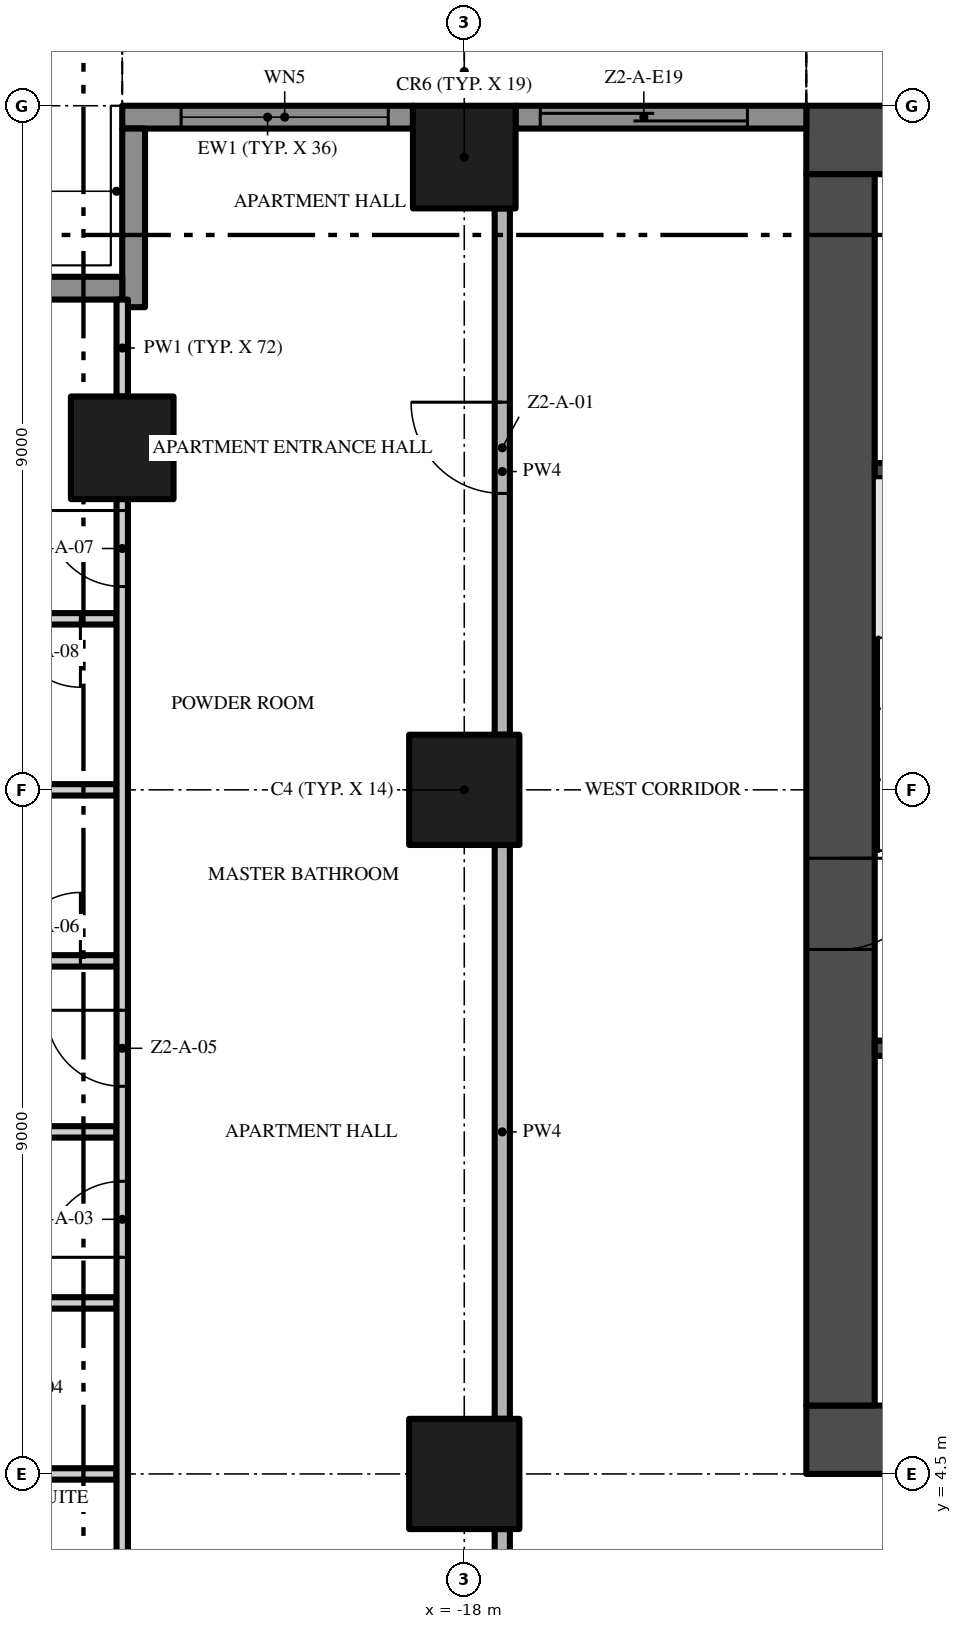
"""IFC4 building model, lengths in metres.
Left out: names, types, materials, properties, quantities, classifications, styles, units other than length and angle.
Written with IfcOpenShell. Run it as: python <this file> out.ifc"""

import sys

from ifc_helpers import new_model, si_unit, direction, frame, frame_2d, origin, origin_2d, place, context, subcontext, project, spatial, rectangle, extrude, element, fill, save


model = new_model("IFC4")
c1 = context("Model", 3, precision=1e-05, world=origin(), true_north=direction((0.0, 1.0)))
c2 = subcontext(c1, "Body", "Model", "MODEL_VIEW")
j1 = project(units=[si_unit("LENGTHUNIT", "METRE"), si_unit("PLANEANGLEUNIT", "RADIAN")], contexts=[c1])
p1 = place(None, origin())
s1 = spatial("IfcSite", under=j1, at=p1, CompositionType="ELEMENT")
p2 = place(p1, origin())
s2 = spatial("IfcBuilding", under=s1, at=p2, CompositionType="ELEMENT")
p3 = place(p2, frame((0.0, 0.0, 77.0)))
s3 = spatial("IfcBuildingStorey", under=s2, at=p3, CompositionType="ELEMENT", Elevation=77.0)
p4 = place(p3, frame((-13.5, 4.95, -0.3), z_axis=(0.0, 0.0, 1.0), x_axis=(1.0, 0.0, 0.0)))
e1 = element("IfcWall", 1, at=p4, inside=s3, PredefinedType="SHEAR", context=c2, shape_type="SweptSolid", body=[
    extrude(rectangle(XDim=27.0, YDim=0.9, at=frame_2d((13.5, 0.0))), origin(), (0.0, 0.0, 1.0), 3.8),
])
p5 = place(p4, frame((12.0, 0.0, 0.3)))
e2 = element("IfcOpeningElement", 2, at=p5, cuts=e1, PredefinedType="OPENING", context=c2, shape_type="SweptSolid", body=[
    extrude(rectangle(XDim=3.0, YDim=2.4, at=frame_2d((1.5, 1.2))), frame((0.0, 0.46, 0.0), z_axis=(0.0, -1.0, 0.0), x_axis=(1.0, 0.0, 0.0)), (0.0, 0.0, 1.0), 0.92),
])
p6 = place(p4, frame((4.9, 0.0, 0.3)))
e3 = element("IfcOpeningElement", 3, at=p6, cuts=e1, PredefinedType="OPENING", context=c2, shape_type="SweptSolid", body=[
    extrude(rectangle(XDim=1.2, YDim=2.2, at=frame_2d((0.6, 1.1))), frame((0.0, 0.46, 0.0), z_axis=(0.0, -1.0, 0.0), x_axis=(1.0, 0.0, 0.0)), (0.0, 0.0, 1.0), 0.92),
])
p7 = place(p4, frame((20.75, 0.0, 0.3)))
e4 = element("IfcOpeningElement", 4, at=p7, cuts=e1, PredefinedType="OPENING", context=c2, shape_type="SweptSolid", body=[
    extrude(rectangle(XDim=1.5, YDim=2.2, at=frame_2d((0.75, 1.1))), frame((0.0, 0.46, 0.0), z_axis=(0.0, -1.0, 0.0), x_axis=(1.0, 0.0, 0.0)), (0.0, 0.0, 1.0), 0.92),
])
p8 = place(p4, frame((17.4, 0.0, 0.3)))
e5 = element("IfcOpeningElement", 5, at=p8, cuts=e1, PredefinedType="OPENING", context=c2, shape_type="SweptSolid", body=[
    extrude(rectangle(XDim=1.2, YDim=2.2, at=frame_2d((0.6, 1.1))), frame((0.0, 0.46, 0.0), z_axis=(0.0, -1.0, 0.0), x_axis=(1.0, 0.0, 0.0)), (0.0, 0.0, 1.0), 0.92),
])
p9 = place(p3, frame((13.5, 22.05, -0.3), z_axis=(0.0, 0.0, 1.0), x_axis=(-1.0, 0.0, 0.0)))
e6 = element("IfcWall", 6, at=p9, inside=s3, PredefinedType="SHEAR", context=c2, shape_type="SweptSolid", body=[
    extrude(rectangle(XDim=27.0, YDim=0.9, at=frame_2d((13.5, 0.0))), origin(), (0.0, 0.0, 1.0), 3.8),
])
p10 = place(p3, frame((-13.05, 21.6, -0.3), z_axis=(0.0, 0.0, 1.0), x_axis=(0.0, -1.0, 0.0)))
e7 = element("IfcWall", 7, at=p10, inside=s3, PredefinedType="SHEAR", context=c2, shape_type="SweptSolid", body=[
    extrude(rectangle(XDim=16.2, YDim=0.9, at=frame_2d((8.1, 0.0))), origin(), (0.0, 0.0, 1.0), 3.8),
])
p11 = place(p10, frame((9.0, 0.0, 0.3)))
e8 = element("IfcOpeningElement", 8, at=p11, cuts=e7, PredefinedType="OPENING", context=c2, shape_type="SweptSolid", body=[
    extrude(rectangle(XDim=1.2, YDim=2.2, at=frame_2d((0.6, 1.1))), frame((0.0, 0.46, 0.0), z_axis=(0.0, -1.0, 0.0), x_axis=(1.0, 0.0, 0.0)), (0.0, 0.0, 1.0), 0.92),
])
p12 = place(p3, frame((-18.0, 13.5, 0.0), z_axis=(0.0, 0.0, 1.0), x_axis=(1.0, 0.0, 0.0)))
e9 = element("IfcColumn", 9, at=p12, inside=s3, PredefinedType="COLUMN", context=c2, shape_type="SweptSolid", body=[
    extrude(rectangle(XDim=1.45, YDim=1.45, at=origin_2d()), origin(), (0.0, 0.0, 1.0), 3.5),
])
p13 = place(p3, frame((-18.0, 21.825, 0.0), z_axis=(0.0, 0.0, 1.0), x_axis=(1.0, 0.0, 0.0)))
e10 = element("IfcColumn", 10, at=p13, inside=s3, PredefinedType="COLUMN", context=c2, shape_type="SweptSolid", body=[
    extrude(rectangle(XDim=1.35, YDim=1.35, at=origin_2d()), origin(), (0.0, 0.0, 1.0), 3.5),
])
p14 = place(p3, frame((-18.0, 4.5, 0.0), z_axis=(0.0, 0.0, 1.0), x_axis=(1.0, 0.0, 0.0)))
e11 = element("IfcColumn", 11, at=p14, inside=s3, PredefinedType="COLUMN", context=c2, shape_type="SweptSolid", body=[
    extrude(rectangle(XDim=1.45, YDim=1.45, at=origin_2d()), origin(), (0.0, 0.0, 1.0), 3.5),
])
p15 = place(p3, frame((-22.5, 18.0, 0.0), z_axis=(0.0, 0.0, 1.0), x_axis=(1.0, 0.0, 0.0)))
e12 = element("IfcColumn", 12, at=p15, inside=s3, PredefinedType="COLUMN", context=c2, shape_type="SweptSolid", body=[
    extrude(rectangle(XDim=1.35, YDim=1.35, at=origin_2d()), origin(), (0.0, 0.0, 1.0), 3.5),
])
p16 = place(p3, frame((-17.325, 22.35, 0.0), z_axis=(0.0, 0.0, 1.0), x_axis=(1.0, 0.0, 0.0)))
e13 = element("IfcWall", 13, at=p16, inside=s3, PredefinedType="SOLIDWALL", context=c2, shape_type="SweptSolid", body=[
    extrude(rectangle(XDim=3.825, YDim=0.3, at=frame_2d((1.913, 0.0))), origin(), (0.0, 0.0, 1.0), 3.5),
])
p17 = place(p16, frame((0.325, 0.0, 0.0)))
e14 = element("IfcOpeningElement", 14, at=p17, cuts=e13, PredefinedType="OPENING", context=c2, shape_type="SweptSolid", body=[
    extrude(rectangle(XDim=2.725, YDim=2.4, at=frame_2d((1.363, 1.2))), frame((0.0, 0.16, 0.0), z_axis=(0.0, -1.0, 0.0), x_axis=(1.0, 0.0, 0.0)), (0.0, 0.0, 1.0), 0.32),
])
p18 = place(p3, frame((-22.5, 22.35, 0.0), z_axis=(0.0, 0.0, 1.0), x_axis=(1.0, 0.0, 0.0)))
e15 = element("IfcWall", 15, at=p18, inside=s3, PredefinedType="SOLIDWALL", context=c2, shape_type="SweptSolid", body=[
    extrude(rectangle(XDim=3.825, YDim=0.3, at=frame_2d((1.913, 0.0))), origin(), (0.0, 0.0, 1.0), 3.5),
])
p19 = place(p18, frame((0.775, 0.0, 0.45)))
e16 = element("IfcOpeningElement", 16, at=p19, cuts=e15, PredefinedType="OPENING", context=c2, shape_type="SweptSolid", body=[
    extrude(rectangle(XDim=2.725, YDim=2.65, at=frame_2d((1.363, 1.325))), frame((0.0, 0.16, 0.0), z_axis=(0.0, -1.0, 0.0), x_axis=(1.0, 0.0, 0.0)), (0.0, 0.0, 1.0), 0.32),
])
p20 = place(p3, frame((-22.35, 19.85, 0.0), z_axis=(0.0, 0.0, 1.0), x_axis=(0.0, 1.0, 0.0)))
e17 = element("IfcWall", 17, at=p20, inside=s3, PredefinedType="SOLIDWALL", context=c2, shape_type="SweptSolid", body=[
    extrude(rectangle(XDim=2.35, YDim=0.3, at=frame_2d((1.175, 0.0))), origin(), (0.0, 0.0, 1.0), 3.5),
])
p21 = place(p3, frame((-24.75, 20.1, 0.0), z_axis=(0.0, 0.0, 1.0), x_axis=(1.0, 0.0, 0.0)))
e18 = element("IfcWall", 18, at=p21, inside=s3, PredefinedType="SOLIDWALL", context=c2, shape_type="SweptSolid", body=[
    extrude(rectangle(XDim=2.25, YDim=0.3, at=frame_2d((1.125, 0.0))), origin(), (0.0, 0.0, 1.0), 3.5),
])
for number, where, z_axis, x_axis in (
    (19, (-12.6, 10.1, 0.0), (0.0, 0.0, 1.0), (1.0, 0.0, 0.0)),
    (20, (-12.6, 17.7, 0.0), (0.0, 0.0, 1.0), (1.0, 0.0, 0.0)),
):
    element("IfcWall", number, at=place(p3, frame(where, z_axis=z_axis, x_axis=x_axis)), inside=s3, PredefinedType="SHEAR", context=c2, shape_type="SweptSolid", body=[
        extrude(rectangle(XDim=2.95, YDim=0.2, at=frame_2d((1.475, 0.0))), origin(), (0.0, 0.0, 1.0), 3.5),
    ])
p22 = place(p3, frame((-25.65, 4.5, 0.0), z_axis=(0.0, 0.0, 1.0), x_axis=(1.0, 0.0, 0.0)))
e21 = element("IfcWall", 21, at=p22, inside=s3, PredefinedType="PARTITIONING", context=c2, shape_type="SweptSolid", body=[
    extrude(rectangle(XDim=3.075, YDim=0.15, at=frame_2d((1.538, 0.0))), origin(), (0.0, 0.0, 1.0), 3.5),
])
p23 = place(p3, frame((-24.45, 6.75, 0.0), z_axis=(0.0, 0.0, 1.0), x_axis=(1.0, 0.0, 0.0)))
e22 = element("IfcWall", 22, at=p23, inside=s3, PredefinedType="PARTITIONING", context=c2, shape_type="SweptSolid", body=[
    extrude(rectangle(XDim=1.875, YDim=0.15, at=frame_2d((0.938, 0.0))), origin(), (0.0, 0.0, 1.0), 3.5),
])
p24 = place(p3, frame((-26.7, 9.0, 0.0), z_axis=(0.0, 0.0, 1.0), x_axis=(1.0, 0.0, 0.0)))
e23 = element("IfcWall", 23, at=p24, inside=s3, PredefinedType="PARTITIONING", context=c2, shape_type="SweptSolid", body=[
    extrude(rectangle(XDim=4.125, YDim=0.15, at=frame_2d((2.062, 0.0))), origin(), (0.0, 0.0, 1.0), 3.5),
])
p25 = place(p3, frame((-24.45, 11.25, 0.0), z_axis=(0.0, 0.0, 1.0), x_axis=(1.0, 0.0, 0.0)))
e24 = element("IfcWall", 24, at=p25, inside=s3, PredefinedType="PARTITIONING", context=c2, shape_type="SweptSolid", body=[
    extrude(rectangle(XDim=1.875, YDim=0.15, at=frame_2d((0.938, 0.0))), origin(), (0.0, 0.0, 1.0), 3.5),
])
p26 = place(p25, frame((0.5, 0.0, 0.0)))
e25 = element("IfcOpeningElement", 25, at=p26, cuts=e24, PredefinedType="OPENING", context=c2, shape_type="SweptSolid", body=[
    extrude(rectangle(XDim=0.9, YDim=2.1, at=frame_2d((0.45, 1.05))), frame((0.0, 0.085, 0.0), z_axis=(0.0, -1.0, 0.0), x_axis=(1.0, 0.0, 0.0)), (0.0, 0.0, 1.0), 0.17),
])
p27 = place(p3, frame((-24.45, 13.5, 0.0), z_axis=(0.0, 0.0, 1.0), x_axis=(1.0, 0.0, 0.0)))
e26 = element("IfcWall", 26, at=p27, inside=s3, PredefinedType="PARTITIONING", context=c2, shape_type="SweptSolid", body=[
    extrude(rectangle(XDim=1.875, YDim=0.15, at=frame_2d((0.938, 0.0))), origin(), (0.0, 0.0, 1.0), 3.5),
])
p28 = place(p3, frame((-22.575, 15.75, 0.0), z_axis=(0.0, 0.0, 1.0), x_axis=(-1.0, 0.0, 0.0)))
e27 = element("IfcWall", 27, at=p28, inside=s3, PredefinedType="PARTITIONING", context=c2, shape_type="SweptSolid", body=[
    extrude(rectangle(XDim=1.875, YDim=0.15, at=frame_2d((0.938, 0.0))), origin(), (0.0, 0.0, 1.0), 3.5),
])
p29 = place(p28, frame((0.475, 0.0, 0.0)))
e28 = element("IfcOpeningElement", 28, at=p29, cuts=e27, PredefinedType="OPENING", context=c2, shape_type="SweptSolid", body=[
    extrude(rectangle(XDim=0.9, YDim=2.1, at=frame_2d((0.45, 1.05))), frame((0.0, 0.085, 0.0), z_axis=(0.0, -1.0, 0.0), x_axis=(1.0, 0.0, 0.0)), (0.0, 0.0, 1.0), 0.17),
])
p30 = place(p3, frame((-22.5, 0.1, 0.0), z_axis=(0.0, 0.0, 1.0), x_axis=(0.0, 1.0, 0.0)))
e29 = element("IfcWall", 29, at=p30, inside=s3, PredefinedType="PARTITIONING", context=c2, shape_type="SweptSolid", body=[
    extrude(rectangle(XDim=17.225, YDim=0.15, at=frame_2d((8.613, 0.0))), origin(), (0.0, 0.0, 1.0), 3.5),
])
p31 = place(p30, frame((1.65, 0.0, 0.0)))
e30 = element("IfcOpeningElement", 30, at=p31, cuts=e29, PredefinedType="OPENING", context=c2, shape_type="SweptSolid", body=[
    extrude(rectangle(XDim=1.0, YDim=2.4, at=frame_2d((0.5, 1.2))), frame((0.0, 0.085, 0.0), z_axis=(0.0, -1.0, 0.0), x_axis=(1.0, 0.0, 0.0)), (0.0, 0.0, 1.0), 0.17),
])
p32 = place(p30, frame((7.25, 0.0, 0.0)))
e31 = element("IfcOpeningElement", 31, at=p32, cuts=e29, PredefinedType="OPENING", context=c2, shape_type="SweptSolid", body=[
    extrude(rectangle(XDim=1.0, YDim=2.4, at=frame_2d((0.5, 1.2))), frame((0.0, 0.085, 0.0), z_axis=(0.0, -1.0, 0.0), x_axis=(1.0, 0.0, 0.0)), (0.0, 0.0, 1.0), 0.17),
])
p33 = place(p30, frame((9.5, 0.0, 0.0)))
e32 = element("IfcOpeningElement", 32, at=p33, cuts=e29, PredefinedType="OPENING", context=c2, shape_type="SweptSolid", body=[
    extrude(rectangle(XDim=1.0, YDim=2.4, at=frame_2d((0.5, 1.2))), frame((0.0, 0.085, 0.0), z_axis=(0.0, -1.0, 0.0), x_axis=(1.0, 0.0, 0.0)), (0.0, 0.0, 1.0), 0.17),
])
p34 = place(p30, frame((16.075, 0.0, 0.0)))
e33 = element("IfcOpeningElement", 33, at=p34, cuts=e29, PredefinedType="OPENING", context=c2, shape_type="SweptSolid", body=[
    extrude(rectangle(XDim=1.0, YDim=2.4, at=frame_2d((0.5, 1.2))), frame((0.0, 0.085, 0.0), z_axis=(0.0, -1.0, 0.0), x_axis=(1.0, 0.0, 0.0)), (0.0, 0.0, 1.0), 0.17),
])
p35 = place(p3, frame((-22.5, 18.675, 0.0), z_axis=(0.0, 0.0, 1.0), x_axis=(0.0, 1.0, 0.0)))
e34 = element("IfcWall", 34, at=p35, inside=s3, PredefinedType="PARTITIONING", context=c2, shape_type="SweptSolid", body=[
    extrude(rectangle(XDim=1.275, YDim=0.15, at=frame_2d((0.637, 0.0))), origin(), (0.0, 0.0, 1.0), 3.5),
])
p36 = place(p3, frame((-17.5, -0.2, 0.0), z_axis=(0.0, 0.0, 1.0), x_axis=(0.0, 1.0, 0.0)))
e35 = element("IfcWall", 35, at=p36, inside=s3, PredefinedType="PARTITIONING", context=c2, shape_type="SweptSolid", body=[
    extrude(rectangle(XDim=3.975, YDim=0.2, at=frame_2d((1.988, 0.0))), origin(), (0.0, 0.0, 1.0), 3.5),
])
p37 = place(p3, frame((-17.5, 5.225, 0.0), z_axis=(0.0, 0.0, 1.0), x_axis=(0.0, 1.0, 0.0)))
e36 = element("IfcWall", 36, at=p37, inside=s3, PredefinedType="PARTITIONING", context=c2, shape_type="SweptSolid", body=[
    extrude(rectangle(XDim=7.55, YDim=0.2, at=frame_2d((3.775, 0.0))), origin(), (0.0, 0.0, 1.0), 3.5),
])
p38 = place(p3, frame((-17.5, 14.225, 0.0), z_axis=(0.0, 0.0, 1.0), x_axis=(0.0, 1.0, 0.0)))
e37 = element("IfcWall", 37, at=p38, inside=s3, PredefinedType="PARTITIONING", context=c2, shape_type="SweptSolid", body=[
    extrude(rectangle(XDim=6.925, YDim=0.2, at=frame_2d((3.462, 0.0))), origin(), (0.0, 0.0, 1.0), 3.5),
])
p39 = place(p38, frame((3.175, 0.0, 0.0)))
e38 = element("IfcOpeningElement", 38, at=p39, cuts=e37, PredefinedType="OPENING", context=c2, shape_type="SweptSolid", body=[
    extrude(rectangle(XDim=1.2, YDim=2.4, at=frame_2d((0.6, 1.2))), frame((0.0, 0.11, 0.0), z_axis=(0.0, -1.0, 0.0), x_axis=(1.0, 0.0, 0.0)), (0.0, 0.0, 1.0), 0.22),
])
p40 = place(p17, origin())
e39 = element("IfcDoor", 39, at=p40, inside=s3, OperationType="SINGLE_SWING_LEFT", PredefinedType="DOOR", context=c2, shape_type="SweptSolid", body=[
    extrude(rectangle(XDim=2.725, YDim=2.4, at=frame_2d((1.363, 1.2))), frame((0.0, 0.025, 0.0), z_axis=(0.0, -1.0, 0.0), x_axis=(1.0, 0.0, 0.0)), (0.0, 0.0, 1.0), 0.05),
])
fill(e14, e39)
p41 = place(p19, origin())
e40 = element("IfcWindow", 40, at=p41, inside=s3, PartitioningType="SINGLE_PANEL", PredefinedType="WINDOW", context=c2, shape_type="SweptSolid", body=[
    extrude(rectangle(XDim=2.725, YDim=2.65, at=frame_2d((1.363, 1.325))), frame((0.0, 0.03, 0.0), z_axis=(0.0, -1.0, 0.0), x_axis=(1.0, 0.0, 0.0)), (0.0, 0.0, 1.0), 0.06),
])
fill(e16, e40)
p42 = place(p11, frame((1.2, 0.0, 0.0), z_axis=(0.0, 0.0, 1.0), x_axis=(-1.0, 0.0, 0.0)))
e41 = element("IfcDoor", 41, at=p42, inside=s3, OperationType="SINGLE_SWING_RIGHT", PredefinedType="DOOR", context=c2, shape_type="SweptSolid", body=[
    extrude(rectangle(XDim=1.2, YDim=2.2, at=frame_2d((0.6, 1.1))), frame((0.0, 0.025, 0.0), z_axis=(0.0, -1.0, 0.0), x_axis=(1.0, 0.0, 0.0)), (0.0, 0.0, 1.0), 0.05),
])
fill(e8, e41)
p43 = place(p39, origin())
e42 = element("IfcDoor", 42, at=p43, inside=s3, OperationType="SINGLE_SWING_RIGHT", PredefinedType="DOOR", context=c2, shape_type="SweptSolid", body=[
    extrude(rectangle(XDim=1.2, YDim=2.4, at=frame_2d((0.6, 1.2))), frame((0.0, 0.025, 0.0), z_axis=(0.0, -1.0, 0.0), x_axis=(1.0, 0.0, 0.0)), (0.0, 0.0, 1.0), 0.05),
])
fill(e38, e42)
p44 = place(p32, origin())
e43 = element("IfcDoor", 43, at=p44, inside=s3, OperationType="SINGLE_SWING_LEFT", PredefinedType="DOOR", context=c2, shape_type="SweptSolid", body=[
    extrude(rectangle(XDim=1.0, YDim=2.4, at=frame_2d((0.5, 1.2))), frame((0.0, 0.025, 0.0), z_axis=(0.0, -1.0, 0.0), x_axis=(1.0, 0.0, 0.0)), (0.0, 0.0, 1.0), 0.05),
])
fill(e31, e43)
p45 = place(p33, origin())
e44 = element("IfcDoor", 44, at=p45, inside=s3, OperationType="SINGLE_SWING_RIGHT", PredefinedType="DOOR", context=c2, shape_type="SweptSolid", body=[
    extrude(rectangle(XDim=1.0, YDim=2.4, at=frame_2d((0.5, 1.2))), frame((0.0, 0.025, 0.0), z_axis=(0.0, -1.0, 0.0), x_axis=(1.0, 0.0, 0.0)), (0.0, 0.0, 1.0), 0.05),
])
fill(e32, e44)
p46 = place(p26, origin())
e45 = element("IfcDoor", 45, at=p46, inside=s3, OperationType="SINGLE_SWING_RIGHT", PredefinedType="DOOR", context=c2, shape_type="SweptSolid", body=[
    extrude(rectangle(XDim=0.9, YDim=2.1, at=frame_2d((0.45, 1.05))), frame((0.0, 0.025, 0.0), z_axis=(0.0, -1.0, 0.0), x_axis=(1.0, 0.0, 0.0)), (0.0, 0.0, 1.0), 0.05),
])
fill(e25, e45)
p47 = place(p34, origin())
e46 = element("IfcDoor", 46, at=p47, inside=s3, OperationType="SINGLE_SWING_RIGHT", PredefinedType="DOOR", context=c2, shape_type="SweptSolid", body=[
    extrude(rectangle(XDim=1.0, YDim=2.4, at=frame_2d((0.5, 1.2))), frame((0.0, 0.025, 0.0), z_axis=(0.0, -1.0, 0.0), x_axis=(1.0, 0.0, 0.0)), (0.0, 0.0, 1.0), 0.05),
])
fill(e33, e46)
p48 = place(p29, origin())
e47 = element("IfcDoor", 47, at=p48, inside=s3, OperationType="SINGLE_SWING_LEFT", PredefinedType="DOOR", context=c2, shape_type="SweptSolid", body=[
    extrude(rectangle(XDim=0.9, YDim=2.1, at=frame_2d((0.45, 1.05))), frame((0.0, 0.025, 0.0), z_axis=(0.0, -1.0, 0.0), x_axis=(1.0, 0.0, 0.0)), (0.0, 0.0, 1.0), 0.05),
])
fill(e28, e47)
save(model, sys.argv[1])
